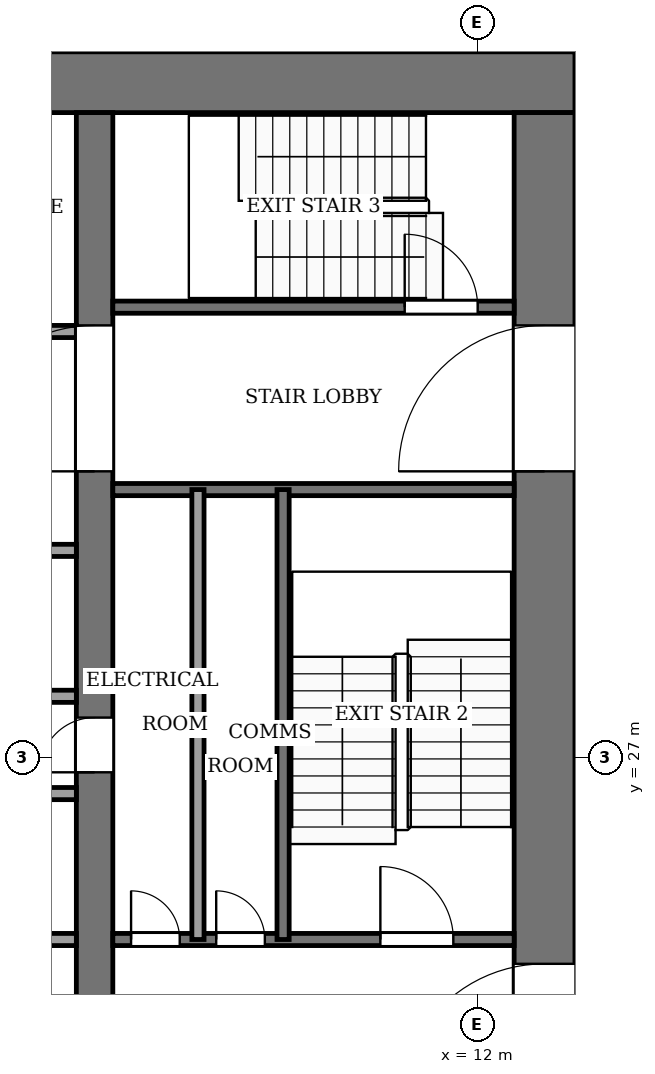
"""IFC4 building model, lengths in metres.
Left out: names, types, materials, properties, quantities, classifications, styles, units other than length and angle.
Written with IfcOpenShell. Run it as: python <this file> out.ifc"""

import sys

from ifc_helpers import new_model, si_unit, direction, frame, frame_2d, origin, place, context, subcontext, project, spatial, rectangle, extrude, element, fill, save


model = new_model("IFC4")
c1 = context("Model", 3, precision=1e-05, world=origin(), true_north=direction((0.0, 1.0)))
c2 = subcontext(c1, "Body", "Model", "MODEL_VIEW")
j1 = project(units=[si_unit("LENGTHUNIT", "METRE"), si_unit("PLANEANGLEUNIT", "RADIAN")], contexts=[c1])
p1 = place(None, origin())
s1 = spatial("IfcSite", under=j1, at=p1, CompositionType="ELEMENT")
p2 = place(p1, origin())
s2 = spatial("IfcBuilding", under=s1, at=p2, CompositionType="ELEMENT")
p3 = place(p2, frame((0.0, 0.0, 150.0)))
s3 = spatial("IfcBuildingStorey", under=s2, at=p3, CompositionType="ELEMENT", Elevation=150.0)
p4 = place(p3, frame((-13.6, 38.1, -0.13), z_axis=(0.0, 0.0, 1.0), x_axis=(1.0, 0.0, 0.0)))
e1 = element("IfcWall", 1, at=p4, inside=s3, PredefinedType="SHEAR", context=c2, shape_type="SweptSolid", body=[
    extrude(rectangle(XDim=27.2, YDim=1.0, at=frame_2d((13.6, 0.0))), origin(), (0.0, 0.0, 1.0), 4.0),
])
p5 = place(p3, frame((13.1, 18.4, -0.13), z_axis=(0.0, 0.0, 1.0), x_axis=(0.0, 1.0, 0.0)))
e2 = element("IfcWall", 2, at=p5, inside=s3, PredefinedType="SHEAR", context=c2, shape_type="SweptSolid", body=[
    extrude(rectangle(XDim=19.2, YDim=1.0, at=frame_2d((9.6, 0.0))), origin(), (0.0, 0.0, 1.0), 4.0),
])
p6 = place(p5, frame((2.8, 0.0, 0.13)))
e3 = element("IfcOpeningElement", 3, at=p6, cuts=e2, PredefinedType="OPENING", context=c2, shape_type="SweptSolid", body=[
    extrude(rectangle(XDim=2.4, YDim=2.4, at=frame_2d((1.2, 1.2))), frame((0.0, 0.51, 0.0), z_axis=(0.0, -1.0, 0.0), x_axis=(1.0, 0.0, 0.0)), (0.0, 0.0, 1.0), 1.02),
])
p7 = place(p5, frame((13.3, 0.0, 0.13)))
e4 = element("IfcOpeningElement", 4, at=p7, cuts=e2, PredefinedType="OPENING", context=c2, shape_type="SweptSolid", body=[
    extrude(rectangle(XDim=2.4, YDim=2.4, at=frame_2d((1.2, 1.2))), frame((0.0, 0.51, 0.0), z_axis=(0.0, -1.0, 0.0), x_axis=(1.0, 0.0, 0.0)), (0.0, 0.0, 1.0), 1.02),
])
p8 = place(p3, frame((5.7, 18.4, -0.13), z_axis=(0.0, 0.0, 1.0), x_axis=(0.0, 1.0, 0.0)))
e5 = element("IfcWall", 5, at=p8, inside=s3, PredefinedType="SHEAR", context=c2, shape_type="SweptSolid", body=[
    extrude(rectangle(XDim=19.2, YDim=0.6, at=frame_2d((9.6, 0.0))), origin(), (0.0, 0.0, 1.0), 4.0),
])
p9 = place(p8, frame((8.35, 0.0, 0.13)))
e6 = element("IfcOpeningElement", 6, at=p9, cuts=e5, PredefinedType="OPENING", context=c2, shape_type="SweptSolid", body=[
    extrude(rectangle(XDim=0.9, YDim=2.1, at=frame_2d((0.45, 1.05))), frame((0.0, 0.31, 0.0), z_axis=(0.0, -1.0, 0.0), x_axis=(1.0, 0.0, 0.0)), (0.0, 0.0, 1.0), 0.62),
])
p10 = place(p8, frame((13.3, 0.0, 0.13)))
e7 = element("IfcOpeningElement", 7, at=p10, cuts=e5, PredefinedType="OPENING", context=c2, shape_type="SweptSolid", body=[
    extrude(rectangle(XDim=2.4, YDim=2.4, at=frame_2d((1.2, 1.2))), frame((0.0, 0.31, 0.0), z_axis=(0.0, -1.0, 0.0), x_axis=(1.0, 0.0, 0.0)), (0.0, 0.0, 1.0), 0.62),
])
p11 = place(p3, frame((-5.4, 24.0, 0.0), z_axis=(0.0, 0.0, 1.0), x_axis=(1.0, 0.0, 0.0)))
e8 = element("IfcWall", 8, at=p11, inside=s3, PredefinedType="PARTITIONING", context=c2, shape_type="SweptSolid", body=[
    extrude(rectangle(XDim=10.8, YDim=0.2, at=frame_2d((5.4, 0.0))), origin(), (0.0, 0.0, 1.0), 3.87),
])
p12 = place(p11, frame((0.75, 0.0, 0.0)))
e9 = element("IfcOpeningElement", 9, at=p12, cuts=e8, PredefinedType="OPENING", context=c2, shape_type="SweptSolid", body=[
    extrude(rectangle(XDim=1.2, YDim=2.2, at=frame_2d((0.6, 1.1))), frame((0.0, 0.11, 0.0), z_axis=(0.0, -1.0, 0.0), x_axis=(1.0, 0.0, 0.0)), (0.0, 0.0, 1.0), 0.22),
])
p13 = place(p11, frame((3.45, 0.0, 0.0)))
e10 = element("IfcOpeningElement", 10, at=p13, cuts=e8, PredefinedType="OPENING", context=c2, shape_type="SweptSolid", body=[
    extrude(rectangle(XDim=1.2, YDim=2.2, at=frame_2d((0.6, 1.1))), frame((0.0, 0.11, 0.0), z_axis=(0.0, -1.0, 0.0), x_axis=(1.0, 0.0, 0.0)), (0.0, 0.0, 1.0), 0.22),
])
p14 = place(p11, frame((6.15, 0.0, 0.0)))
e11 = element("IfcOpeningElement", 11, at=p14, cuts=e8, PredefinedType="OPENING", context=c2, shape_type="SweptSolid", body=[
    extrude(rectangle(XDim=1.2, YDim=2.2, at=frame_2d((0.6, 1.1))), frame((0.0, 0.11, 0.0), z_axis=(0.0, -1.0, 0.0), x_axis=(1.0, 0.0, 0.0)), (0.0, 0.0, 1.0), 0.22),
])
p15 = place(p11, frame((8.85, 0.0, 0.0)))
e12 = element("IfcOpeningElement", 12, at=p15, cuts=e8, PredefinedType="OPENING", context=c2, shape_type="SweptSolid", body=[
    extrude(rectangle(XDim=1.2, YDim=2.2, at=frame_2d((0.6, 1.1))), frame((0.0, 0.11, 0.0), z_axis=(0.0, -1.0, 0.0), x_axis=(1.0, 0.0, 0.0)), (0.0, 0.0, 1.0), 0.22),
])
p16 = place(p3, frame((6.0, 24.0, 0.0), z_axis=(0.0, 0.0, 1.0), x_axis=(1.0, 0.0, 0.0)))
e13 = element("IfcWall", 13, at=p16, inside=s3, PredefinedType="PARTITIONING", context=c2, shape_type="SweptSolid", body=[
    extrude(rectangle(XDim=6.6, YDim=0.2, at=frame_2d((3.3, 0.0))), origin(), (0.0, 0.0, 1.0), 3.87),
])
p17 = place(p16, frame((0.3, 0.0, 0.0)))
e14 = element("IfcOpeningElement", 14, at=p17, cuts=e13, PredefinedType="OPENING", context=c2, shape_type="SweptSolid", body=[
    extrude(rectangle(XDim=0.8, YDim=2.1, at=frame_2d((0.4, 1.05))), frame((0.0, 0.11, 0.0), z_axis=(0.0, -1.0, 0.0), x_axis=(1.0, 0.0, 0.0)), (0.0, 0.0, 1.0), 0.22),
])
p18 = place(p16, frame((1.7, 0.0, 0.0)))
e15 = element("IfcOpeningElement", 15, at=p18, cuts=e13, PredefinedType="OPENING", context=c2, shape_type="SweptSolid", body=[
    extrude(rectangle(XDim=0.8, YDim=2.1, at=frame_2d((0.4, 1.05))), frame((0.0, 0.11, 0.0), z_axis=(0.0, -1.0, 0.0), x_axis=(1.0, 0.0, 0.0)), (0.0, 0.0, 1.0), 0.22),
])
p19 = place(p16, frame((4.4, 0.0, 0.0)))
e16 = element("IfcOpeningElement", 16, at=p19, cuts=e13, PredefinedType="OPENING", context=c2, shape_type="SweptSolid", body=[
    extrude(rectangle(XDim=1.2, YDim=2.2, at=frame_2d((0.6, 1.1))), frame((0.0, 0.11, 0.0), z_axis=(0.0, -1.0, 0.0), x_axis=(1.0, 0.0, 0.0)), (0.0, 0.0, 1.0), 0.22),
])
for number, where, z_axis, x_axis in (
    (17, (-5.4, 26.4, 0.0), (0.0, 0.0, 1.0), (1.0, 0.0, 0.0)),
    (18, (-5.4, 28.0, 0.0), (0.0, 0.0, 1.0), (1.0, 0.0, 0.0)),
    (19, (-5.4, 30.4, 0.0), (0.0, 0.0, 1.0), (1.0, 0.0, 0.0)),
):
    element("IfcWall", number, at=place(p3, frame(where, z_axis=z_axis, x_axis=x_axis)), inside=s3, PredefinedType="PARTITIONING", context=c2, shape_type="SweptSolid", body=[
        extrude(rectangle(XDim=10.8, YDim=0.2, at=frame_2d((5.4, 0.0))), origin(), (0.0, 0.0, 1.0), 3.87),
    ])
p20 = place(p3, frame((6.0, 31.4, 0.0), z_axis=(0.0, 0.0, 1.0), x_axis=(1.0, 0.0, 0.0)))
e20 = element("IfcWall", 20, at=p20, inside=s3, PredefinedType="PARTITIONING", context=c2, shape_type="SweptSolid", body=[
    extrude(rectangle(XDim=6.6, YDim=0.2, at=frame_2d((3.3, 0.0))), origin(), (0.0, 0.0, 1.0), 3.87),
])
p21 = place(p3, frame((-5.4, 34.0, 0.0), z_axis=(0.0, 0.0, 1.0), x_axis=(1.0, 0.0, 0.0)))
e21 = element("IfcWall", 21, at=p21, inside=s3, PredefinedType="PARTITIONING", context=c2, shape_type="SweptSolid", body=[
    extrude(rectangle(XDim=10.8, YDim=0.2, at=frame_2d((5.4, 0.0))), origin(), (0.0, 0.0, 1.0), 3.87),
])
p22 = place(p21, frame((6.15, 0.0, 0.0)))
e22 = element("IfcOpeningElement", 22, at=p22, cuts=e21, PredefinedType="OPENING", context=c2, shape_type="SweptSolid", body=[
    extrude(rectangle(XDim=1.2, YDim=2.2, at=frame_2d((0.6, 1.1))), frame((0.0, 0.11, 0.0), z_axis=(0.0, -1.0, 0.0), x_axis=(1.0, 0.0, 0.0)), (0.0, 0.0, 1.0), 0.22),
])
p23 = place(p21, frame((8.95, 0.0, 0.0)))
e23 = element("IfcOpeningElement", 23, at=p23, cuts=e21, PredefinedType="OPENING", context=c2, shape_type="SweptSolid", body=[
    extrude(rectangle(XDim=1.0, YDim=2.1, at=frame_2d((0.5, 1.05))), frame((0.0, 0.11, 0.0), z_axis=(0.0, -1.0, 0.0), x_axis=(1.0, 0.0, 0.0)), (0.0, 0.0, 1.0), 0.22),
])
p24 = place(p3, frame((6.0, 34.4, 0.0), z_axis=(0.0, 0.0, 1.0), x_axis=(1.0, 0.0, 0.0)))
e24 = element("IfcWall", 24, at=p24, inside=s3, PredefinedType="PARTITIONING", context=c2, shape_type="SweptSolid", body=[
    extrude(rectangle(XDim=6.6, YDim=0.2, at=frame_2d((3.3, 0.0))), origin(), (0.0, 0.0, 1.0), 3.87),
])
p25 = place(p24, frame((4.8, 0.0, 0.0)))
e25 = element("IfcOpeningElement", 25, at=p25, cuts=e24, PredefinedType="OPENING", context=c2, shape_type="SweptSolid", body=[
    extrude(rectangle(XDim=1.2, YDim=2.2, at=frame_2d((0.6, 1.1))), frame((0.0, 0.11, 0.0), z_axis=(0.0, -1.0, 0.0), x_axis=(1.0, 0.0, 0.0)), (0.0, 0.0, 1.0), 0.22),
])
for number, where, z_axis, x_axis in (
    (26, (7.4, 24.0, 0.0), (0.0, 0.0, 1.0), (0.0, 1.0, 0.0)),
    (27, (8.8, 24.0, 0.0), (0.0, 0.0, 1.0), (0.0, 1.0, 0.0)),
):
    element("IfcWall", number, at=place(p3, frame(where, z_axis=z_axis, x_axis=x_axis)), inside=s3, PredefinedType="PARTITIONING", context=c2, shape_type="SweptSolid", body=[
        extrude(rectangle(XDim=7.4, YDim=0.2, at=frame_2d((3.7, 0.0))), origin(), (0.0, 0.0, 1.0), 3.87),
    ])
p26 = place(p17, origin())
e28 = element("IfcDoor", 28, at=p26, inside=s3, OperationType="SINGLE_SWING_RIGHT", PredefinedType="DOOR", context=c2, shape_type="SweptSolid", body=[
    extrude(rectangle(XDim=0.8, YDim=2.1, at=frame_2d((0.4, 1.05))), frame((0.0, 0.025, 0.0), z_axis=(0.0, -1.0, 0.0), x_axis=(1.0, 0.0, 0.0)), (0.0, 0.0, 1.0), 0.05),
])
fill(e14, e28)
p27 = place(p18, origin())
e29 = element("IfcDoor", 29, at=p27, inside=s3, OperationType="SINGLE_SWING_LEFT", PredefinedType="DOOR", context=c2, shape_type="SweptSolid", body=[
    extrude(rectangle(XDim=0.8, YDim=2.1, at=frame_2d((0.4, 1.05))), frame((0.0, 0.025, 0.0), z_axis=(0.0, -1.0, 0.0), x_axis=(1.0, 0.0, 0.0)), (0.0, 0.0, 1.0), 0.05),
])
fill(e15, e29)
p28 = place(p9, origin())
e30 = element("IfcDoor", 30, at=p28, inside=s3, OperationType="SINGLE_SWING_RIGHT", PredefinedType="DOOR", context=c2, shape_type="SweptSolid", body=[
    extrude(rectangle(XDim=0.9, YDim=2.1, at=frame_2d((0.45, 1.05))), frame((0.0, 0.025, 0.0), z_axis=(0.0, -1.0, 0.0), x_axis=(1.0, 0.0, 0.0)), (0.0, 0.0, 1.0), 0.05),
])
fill(e6, e30)
p29 = place(p19, origin())
e31 = element("IfcDoor", 31, at=p29, inside=s3, OperationType="SINGLE_SWING_LEFT", PredefinedType="DOOR", context=c2, shape_type="SweptSolid", body=[
    extrude(rectangle(XDim=1.2, YDim=2.2, at=frame_2d((0.6, 1.1))), frame((0.0, 0.025, 0.0), z_axis=(0.0, -1.0, 0.0), x_axis=(1.0, 0.0, 0.0)), (0.0, 0.0, 1.0), 0.05),
])
fill(e16, e31)
p30 = place(p25, origin())
e32 = element("IfcDoor", 32, at=p30, inside=s3, OperationType="SINGLE_SWING_RIGHT", PredefinedType="DOOR", context=c2, shape_type="SweptSolid", body=[
    extrude(rectangle(XDim=1.2, YDim=2.2, at=frame_2d((0.6, 1.1))), frame((0.0, 0.025, 0.0), z_axis=(0.0, -1.0, 0.0), x_axis=(1.0, 0.0, 0.0)), (0.0, 0.0, 1.0), 0.05),
])
fill(e25, e32)
p31 = place(p10, origin())
e33 = element("IfcDoor", 33, at=p31, inside=s3, OperationType="DOUBLE_DOOR_SINGLE_SWING", PredefinedType="DOOR", context=c2, shape_type="SweptSolid", body=[
    extrude(rectangle(XDim=2.4, YDim=2.4, at=frame_2d((1.2, 1.2))), frame((0.0, 0.025, 0.0), z_axis=(0.0, -1.0, 0.0), x_axis=(1.0, 0.0, 0.0)), (0.0, 0.0, 1.0), 0.05),
])
fill(e7, e33)
p32 = place(p6, origin())
e34 = element("IfcDoor", 34, at=p32, inside=s3, OperationType="DOUBLE_DOOR_SINGLE_SWING", PredefinedType="DOOR", context=c2, shape_type="SweptSolid", body=[
    extrude(rectangle(XDim=2.4, YDim=2.4, at=frame_2d((1.2, 1.2))), frame((0.0, 0.025, 0.0), z_axis=(0.0, -1.0, 0.0), x_axis=(1.0, 0.0, 0.0)), (0.0, 0.0, 1.0), 0.05),
])
fill(e3, e34)
p33 = place(p7, origin())
e35 = element("IfcDoor", 35, at=p33, inside=s3, OperationType="DOUBLE_DOOR_SINGLE_SWING", PredefinedType="DOOR", context=c2, shape_type="SweptSolid", body=[
    extrude(rectangle(XDim=2.4, YDim=2.4, at=frame_2d((1.2, 1.2))), frame((0.0, 0.025, 0.0), z_axis=(0.0, -1.0, 0.0), x_axis=(1.0, 0.0, 0.0)), (0.0, 0.0, 1.0), 0.05),
])
fill(e4, e35)
save(model, sys.argv[1])
